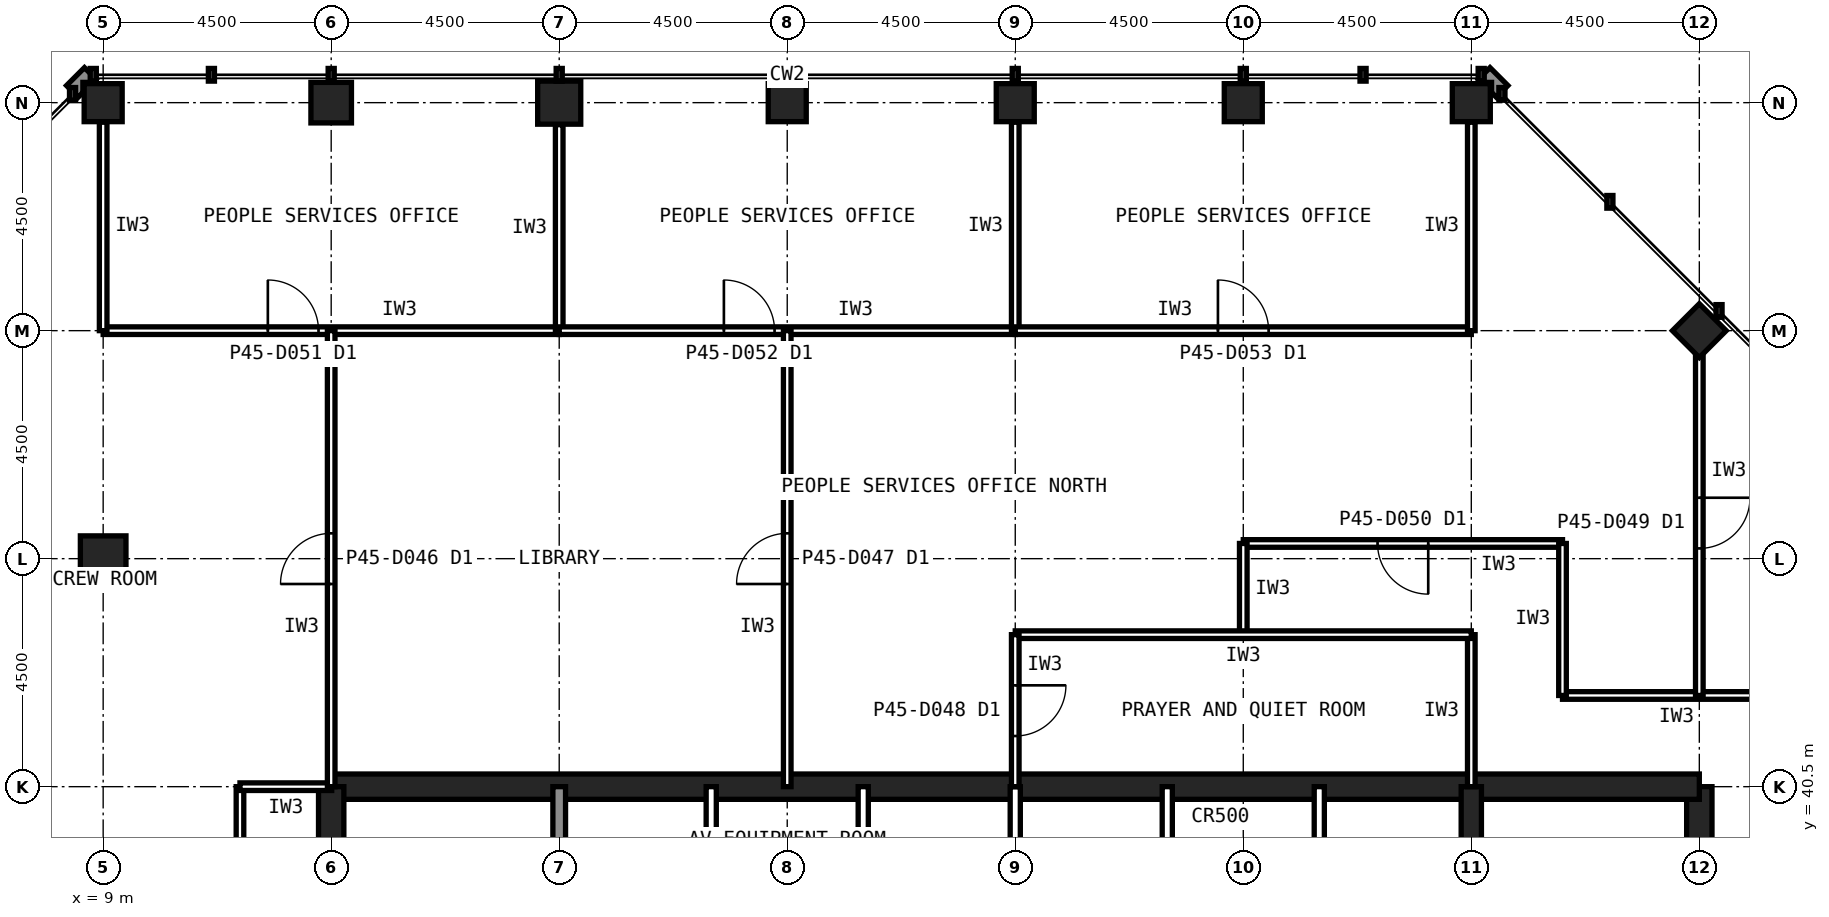
"""IFC4 building model, lengths in metres.
Left out: names, types, materials, properties, quantities, classifications, styles, units other than length and angle.
Written with IfcOpenShell. Run it as: python <this file> out.ifc"""

import sys

from ifc_helpers import new_model, si_unit, direction, frame, frame_2d, origin, origin_2d, place, context, subcontext, project, spatial, rectangle, hollow_rectangle, extrude, element, fill, save


model = new_model("IFC4")
c1 = context("Model", 3, precision=1e-05, world=origin(), true_north=direction((0.0, 1.0)))
c2 = subcontext(c1, "Body", "Model", "MODEL_VIEW")
j1 = project(units=[si_unit("LENGTHUNIT", "METRE"), si_unit("PLANEANGLEUNIT", "RADIAN")], contexts=[c1])
p1 = place(None, origin())
s1 = spatial("IfcSite", under=j1, at=p1, CompositionType="ELEMENT")
p2 = place(p1, origin())
s2 = spatial("IfcBuilding", under=s1, at=p2, CompositionType="ELEMENT")
p3 = place(p2, frame((0.0, 0.0, 191.6)))
s3 = spatial("IfcBuildingStorey", under=s2, at=p3, CompositionType="ELEMENT", Elevation=191.6)
for number, where, z_axis, x_axis in (
    (1, (36.0, 54.0, 0.0), (0.0, 0.0, 1.0), (1.0, 0.0, 0.0)),
    (2, (31.5, 54.0, 0.0), (0.0, 0.0, 1.0), (1.0, 0.0, 0.0)),
    (3, (27.0, 54.0, 0.0), (0.0, 0.0, 1.0), (1.0, 0.0, 0.0)),
    (4, (22.5, 54.0, 0.0), (0.0, 0.0, 1.0), (1.0, 0.0, 0.0)),
):
    element("IfcColumn", number, at=place(p3, frame(where, z_axis=z_axis, x_axis=x_axis)), inside=s3, PredefinedType="COLUMN", context=c2, shape_type="SweptSolid", body=[
        extrude(hollow_rectangle(XDim=0.75, YDim=0.75, WallThickness=0.04, at=origin_2d()), origin(), (0.0, 0.0, 1.0), 4.0),
    ])
p4 = place(p3, frame((18.0, 54.0, 0.0), z_axis=(0.0, 0.0, 1.0), x_axis=(1.0, 0.0, 0.0)))
e5 = element("IfcColumn", 5, at=p4, inside=s3, PredefinedType="COLUMN", context=c2, shape_type="SweptSolid", body=[
    extrude(hollow_rectangle(XDim=0.85, YDim=0.85, WallThickness=0.05, at=origin_2d()), origin(), (0.0, 0.0, 1.0), 4.0),
])
p5 = place(p3, frame((13.5, 54.0, 0.0), z_axis=(0.0, 0.0, 1.0), x_axis=(1.0, 0.0, 0.0)))
e6 = element("IfcColumn", 6, at=p5, inside=s3, PredefinedType="COLUMN", context=c2, shape_type="SweptSolid", body=[
    extrude(hollow_rectangle(XDim=0.8, YDim=0.8, WallThickness=0.045, at=origin_2d()), origin(), (0.0, 0.0, 1.0), 4.0),
])
for number, where, z_axis, x_axis in (
    (7, (9.0, 54.0, 0.0), (0.0, 0.0, 1.0), (1.0, 0.0, 0.0)),
    (8, (40.5, 49.5, 0.0), (0.0, 0.0, 1.0), (0.707, 0.707, 0.0)),
):
    element("IfcColumn", number, at=place(p3, frame(where, z_axis=z_axis, x_axis=x_axis)), inside=s3, PredefinedType="COLUMN", context=c2, shape_type="SweptSolid", body=[
        extrude(hollow_rectangle(XDim=0.75, YDim=0.75, WallThickness=0.04, at=origin_2d()), origin(), (0.0, 0.0, 1.0), 4.0),
    ])
p6 = place(p3, frame((9.0, 45.0, 0.0), z_axis=(0.0, 0.0, 1.0), x_axis=(1.0, 0.0, 0.0)))
e9 = element("IfcColumn", 9, at=p6, inside=s3, PredefinedType="COLUMN", context=c2, shape_type="SweptSolid", body=[
    extrude(hollow_rectangle(XDim=0.9, YDim=0.9, WallThickness=0.063, at=origin_2d()), origin(), (0.0, 0.0, 1.0), 4.0),
])
p7 = place(p3, frame((40.5, 13.5, 0.0), z_axis=(0.0, 0.0, 1.0), x_axis=(0.0, 1.0, 0.0)))
e10 = element("IfcWall", 10, at=p7, inside=s3, PredefinedType="SHEAR", context=c2, shape_type="SweptSolid", body=[
    extrude(rectangle(XDim=27.0, YDim=0.5, at=frame_2d((13.5, 0.0))), origin(), (0.0, 0.0, 1.0), 4.0),
])
p8 = place(p7, frame((5.85, 0.0, 0.0)))
e11 = element("IfcOpeningElement", 11, at=p8, cuts=e10, PredefinedType="OPENING", context=c2, shape_type="SweptSolid", body=[
    extrude(rectangle(XDim=1.8, YDim=2.1, at=frame_2d((0.9, 1.05))), frame((0.0, 0.26, 0.0), z_axis=(0.0, -1.0, 0.0), x_axis=(1.0, 0.0, 0.0)), (0.0, 0.0, 1.0), 0.52),
])
p9 = place(p7, frame((19.65, 0.0, 0.0)))
e12 = element("IfcOpeningElement", 12, at=p9, cuts=e10, PredefinedType="OPENING", context=c2, shape_type="SweptSolid", body=[
    extrude(rectangle(XDim=1.2, YDim=2.1, at=frame_2d((0.6, 1.05))), frame((0.0, 0.26, 0.0), z_axis=(0.0, -1.0, 0.0), x_axis=(1.0, 0.0, 0.0)), (0.0, 0.0, 1.0), 0.52),
])
p10 = place(p3, frame((40.5, 40.5, 0.0), z_axis=(0.0, 0.0, 1.0), x_axis=(-1.0, 0.0, 0.0)))
e13 = element("IfcWall", 13, at=p10, inside=s3, PredefinedType="SHEAR", context=c2, shape_type="SweptSolid", body=[
    extrude(rectangle(XDim=27.0, YDim=0.5, at=frame_2d((13.5, 0.0))), origin(), (0.0, 0.0, 1.0), 4.0),
])
p11 = place(p3, frame((13.5, 40.5, 0.0), z_axis=(0.0, 0.0, 1.0), x_axis=(0.0, -1.0, 0.0)))
e14 = element("IfcWall", 14, at=p11, inside=s3, PredefinedType="SHEAR", context=c2, shape_type="SweptSolid", body=[
    extrude(rectangle(XDim=27.0, YDim=0.5, at=frame_2d((13.5, 0.0))), origin(), (0.0, 0.0, 1.0), 4.0),
])
p12 = place(p11, frame((19.65, 0.0, 0.0)))
e15 = element("IfcOpeningElement", 15, at=p12, cuts=e14, PredefinedType="OPENING", context=c2, shape_type="SweptSolid", body=[
    extrude(rectangle(XDim=1.2, YDim=2.1, at=frame_2d((0.6, 1.05))), frame((0.0, 0.26, 0.0), z_axis=(0.0, -1.0, 0.0), x_axis=(1.0, 0.0, 0.0)), (0.0, 0.0, 1.0), 0.52),
])
p13 = place(p11, frame((5.85, 0.0, 0.0)))
e16 = element("IfcOpeningElement", 16, at=p13, cuts=e14, PredefinedType="OPENING", context=c2, shape_type="SweptSolid", body=[
    extrude(rectangle(XDim=1.8, YDim=2.1, at=frame_2d((0.9, 1.05))), frame((0.0, 0.26, 0.0), z_axis=(0.0, -1.0, 0.0), x_axis=(1.0, 0.0, 0.0)), (0.0, 0.0, 1.0), 0.52),
])
p14 = place(p3, frame((18.0, 36.0, 0.0), z_axis=(0.0, 0.0, 1.0), x_axis=(0.0, 1.0, 0.0)))
e17 = element("IfcWall", 17, at=p14, inside=s3, PredefinedType="SOLIDWALL", context=c2, shape_type="SweptSolid", body=[
    extrude(rectangle(XDim=4.5, YDim=0.25, at=frame_2d((2.25, 0.0))), origin(), (0.0, 0.0, 1.0), 3.84),
])
p15 = place(p3, frame((36.0, 22.5, 0.0), z_axis=(0.0, 0.0, 1.0), x_axis=(0.0, 1.0, 0.0)))
e18 = element("IfcWall", 18, at=p15, inside=s3, PredefinedType="SHEAR", context=c2, shape_type="SweptSolid", body=[
    extrude(rectangle(XDim=18.0, YDim=0.4, at=frame_2d((9.0, 0.0))), origin(), (0.0, 0.0, 1.0), 4.0),
])
for number, where, z_axis, x_axis in (
    (19, (21.0, 36.0, 0.0), (0.0, 0.0, 1.0), (0.0, 1.0, 0.0)),
    (20, (24.0, 36.0, 0.0), (0.0, 0.0, 1.0), (0.0, 1.0, 0.0)),
    (21, (27.0, 36.0, 0.0), (0.0, 0.0, 1.0), (0.0, 1.0, 0.0)),
    (22, (30.0, 36.0, 0.0), (0.0, 0.0, 1.0), (0.0, 1.0, 0.0)),
    (23, (33.0, 36.0, 0.0), (0.0, 0.0, 1.0), (0.0, 1.0, 0.0)),
):
    element("IfcWall", number, at=place(p3, frame(where, z_axis=z_axis, x_axis=x_axis)), inside=s3, PredefinedType="PARTITIONING", context=c2, shape_type="SweptSolid", body=[
        extrude(rectangle(XDim=4.5, YDim=0.2, at=frame_2d((2.25, 0.0))), origin(), (0.0, 0.0, 1.0), 3.84),
    ])
p16 = place(p3, frame((11.7, 40.5, 0.0), z_axis=(0.0, 0.0, 1.0), x_axis=(0.0, -1.0, 0.0)))
e24 = element("IfcWall", 24, at=p16, inside=s3, PredefinedType="PARTITIONING", context=c2, shape_type="SweptSolid", body=[
    extrude(rectangle(XDim=7.2, YDim=0.15, at=frame_2d((3.6, 0.0))), origin(), (0.0, 0.0, 1.0), 3.84),
])
p17 = place(p3, frame((37.8, 45.3, 0.0), z_axis=(0.0, 0.0, 1.0), x_axis=(-1.0, 0.0, 0.0)))
e25 = element("IfcWall", 25, at=p17, inside=s3, PredefinedType="PARTITIONING", context=c2, shape_type="SweptSolid", body=[
    extrude(rectangle(XDim=6.3, YDim=0.15, at=frame_2d((3.15, 0.0))), origin(), (0.0, 0.0, 1.0), 3.84),
])
p18 = place(p17, frame((2.65, 0.0, 0.0)))
e26 = element("IfcOpeningElement", 26, at=p18, cuts=e25, PredefinedType="OPENING", context=c2, shape_type="SweptSolid", body=[
    extrude(rectangle(XDim=1.0, YDim=2.1, at=frame_2d((0.5, 1.05))), frame((0.0, 0.085, 0.0), z_axis=(0.0, -1.0, 0.0), x_axis=(1.0, 0.0, 0.0)), (0.0, 0.0, 1.0), 0.17),
])
p19 = place(p3, frame((42.3, 42.3, 0.0), z_axis=(0.0, 0.0, 1.0), x_axis=(-1.0, 0.0, 0.0)))
e27 = element("IfcWall", 27, at=p19, inside=s3, PredefinedType="PARTITIONING", context=c2, shape_type="SweptSolid", body=[
    extrude(rectangle(XDim=4.5, YDim=0.15, at=frame_2d((2.25, 0.0))), origin(), (0.0, 0.0, 1.0), 3.84),
])
p20 = place(p3, frame((37.8, 42.3, 0.0), z_axis=(0.0, 0.0, 1.0), x_axis=(0.0, 1.0, 0.0)))
e28 = element("IfcWall", 28, at=p20, inside=s3, PredefinedType="PARTITIONING", context=c2, shape_type="SweptSolid", body=[
    extrude(rectangle(XDim=3.0, YDim=0.15, at=frame_2d((1.5, 0.0))), origin(), (0.0, 0.0, 1.0), 3.84),
])
p21 = place(p3, frame((13.51, 40.5, 0.0), z_axis=(0.0, 0.0, 1.0), x_axis=(-1.0, 0.0, 0.0)))
e29 = element("IfcWall", 29, at=p21, inside=s3, PredefinedType="PARTITIONING", context=c2, shape_type="SweptSolid", body=[
    extrude(rectangle(XDim=1.81, YDim=0.15, at=frame_2d((0.905, 0.0))), origin(), (0.0, 0.0, 1.0), 2.989),
])
p22 = place(p3, frame((31.5, 45.3, 0.0), z_axis=(0.0, 0.0, 1.0), x_axis=(0.0, -1.0, 0.0)))
e30 = element("IfcWall", 30, at=p22, inside=s3, PredefinedType="PARTITIONING", context=c2, shape_type="SweptSolid", body=[
    extrude(rectangle(XDim=1.8, YDim=0.15, at=frame_2d((0.9, 0.0))), origin(), (0.0, 0.0, 1.0), 2.989),
])
p23 = place(p3, frame((36.0, 40.5, 0.0), z_axis=(0.0, 0.0, 1.0), x_axis=(0.0, 1.0, 0.0)))
e31 = element("IfcWall", 31, at=p23, inside=s3, PredefinedType="PARTITIONING", context=c2, shape_type="SweptSolid", body=[
    extrude(rectangle(XDim=3.0, YDim=0.15, at=frame_2d((1.5, 0.0))), origin(), (0.0, 0.0, 1.0), 2.989),
])
p24 = place(p3, frame((36.0, 43.5, 0.0), z_axis=(0.0, 0.0, 1.0), x_axis=(-1.0, 0.0, 0.0)))
e32 = element("IfcWall", 32, at=p24, inside=s3, PredefinedType="PARTITIONING", context=c2, shape_type="SweptSolid", body=[
    extrude(rectangle(XDim=9.0, YDim=0.15, at=frame_2d((4.5, 0.0))), origin(), (0.0, 0.0, 1.0), 3.84),
])
p25 = place(p3, frame((27.0, 43.5, 0.0), z_axis=(0.0, 0.0, 1.0), x_axis=(0.0, -1.0, 0.0)))
e33 = element("IfcWall", 33, at=p25, inside=s3, PredefinedType="PARTITIONING", context=c2, shape_type="SweptSolid", body=[
    extrude(rectangle(XDim=3.0, YDim=0.15, at=frame_2d((1.5, 0.0))), origin(), (0.0, 0.0, 1.0), 2.989),
])
p26 = place(p25, frame((1.0, 0.0, 0.0)))
e34 = element("IfcOpeningElement", 34, at=p26, cuts=e33, PredefinedType="OPENING", context=c2, shape_type="SweptSolid", body=[
    extrude(rectangle(XDim=1.0, YDim=2.1, at=frame_2d((0.5, 1.05))), frame((0.0, 0.085, 0.0), z_axis=(0.0, -1.0, 0.0), x_axis=(1.0, 0.0, 0.0)), (0.0, 0.0, 1.0), 0.17),
])
p27 = place(p3, frame((9.0, 49.5, 0.0), z_axis=(0.0, 0.0, 1.0), x_axis=(1.0, 0.0, 0.0)))
e35 = element("IfcWall", 35, at=p27, inside=s3, PredefinedType="PARTITIONING", context=c2, shape_type="SweptSolid", body=[
    extrude(rectangle(XDim=9.0, YDim=0.15, at=frame_2d((4.5, 0.0))), origin(), (0.0, 0.0, 1.0), 3.84),
])
p28 = place(p27, frame((3.25, 0.0, 0.0)))
e36 = element("IfcOpeningElement", 36, at=p28, cuts=e35, PredefinedType="OPENING", context=c2, shape_type="SweptSolid", body=[
    extrude(rectangle(XDim=1.0, YDim=2.1, at=frame_2d((0.5, 1.05))), frame((0.0, 0.085, 0.0), z_axis=(0.0, -1.0, 0.0), x_axis=(1.0, 0.0, 0.0)), (0.0, 0.0, 1.0), 0.17),
])
p29 = place(p3, frame((18.0, 49.5, 0.0), z_axis=(0.0, 0.0, 1.0), x_axis=(0.0, 1.0, 0.0)))
e37 = element("IfcWall", 37, at=p29, inside=s3, PredefinedType="PARTITIONING", context=c2, shape_type="SweptSolid", body=[
    extrude(rectangle(XDim=4.065, YDim=0.15, at=frame_2d((2.032, 0.0))), origin(), (0.0, 0.0, 1.0), 2.989),
])
p30 = place(p3, frame((9.0, 53.615, 0.0), z_axis=(0.0, 0.0, 1.0), x_axis=(0.0, -1.0, 0.0)))
e38 = element("IfcWall", 38, at=p30, inside=s3, PredefinedType="PARTITIONING", context=c2, shape_type="SweptSolid", body=[
    extrude(rectangle(XDim=4.115, YDim=0.15, at=frame_2d((2.058, 0.0))), origin(), (0.0, 0.0, 1.0), 3.229),
])
p31 = place(p3, frame((18.0, 49.5, 0.0), z_axis=(0.0, 0.0, 1.0), x_axis=(1.0, 0.0, 0.0)))
e39 = element("IfcWall", 39, at=p31, inside=s3, PredefinedType="PARTITIONING", context=c2, shape_type="SweptSolid", body=[
    extrude(rectangle(XDim=9.0, YDim=0.15, at=frame_2d((4.5, 0.0))), origin(), (0.0, 0.0, 1.0), 3.84),
])
p32 = place(p31, frame((3.25, 0.0, 0.0)))
e40 = element("IfcOpeningElement", 40, at=p32, cuts=e39, PredefinedType="OPENING", context=c2, shape_type="SweptSolid", body=[
    extrude(rectangle(XDim=1.0, YDim=2.1, at=frame_2d((0.5, 1.05))), frame((0.0, 0.085, 0.0), z_axis=(0.0, -1.0, 0.0), x_axis=(1.0, 0.0, 0.0)), (0.0, 0.0, 1.0), 0.17),
])
p33 = place(p3, frame((27.0, 49.5, 0.0), z_axis=(0.0, 0.0, 1.0), x_axis=(0.0, 1.0, 0.0)))
e41 = element("IfcWall", 41, at=p33, inside=s3, PredefinedType="PARTITIONING", context=c2, shape_type="SweptSolid", body=[
    extrude(rectangle(XDim=4.115, YDim=0.15, at=frame_2d((2.058, 0.0))), origin(), (0.0, 0.0, 1.0), 2.989),
])
p34 = place(p3, frame((27.0, 49.5, 0.0), z_axis=(0.0, 0.0, 1.0), x_axis=(1.0, 0.0, 0.0)))
e42 = element("IfcWall", 42, at=p34, inside=s3, PredefinedType="PARTITIONING", context=c2, shape_type="SweptSolid", body=[
    extrude(rectangle(XDim=9.0, YDim=0.15, at=frame_2d((4.5, 0.0))), origin(), (0.0, 0.0, 1.0), 3.84),
])
p35 = place(p34, frame((4.0, 0.0, 0.0)))
e43 = element("IfcOpeningElement", 43, at=p35, cuts=e42, PredefinedType="OPENING", context=c2, shape_type="SweptSolid", body=[
    extrude(rectangle(XDim=1.0, YDim=2.1, at=frame_2d((0.5, 1.05))), frame((0.0, 0.085, 0.0), z_axis=(0.0, -1.0, 0.0), x_axis=(1.0, 0.0, 0.0)), (0.0, 0.0, 1.0), 0.17),
])
p36 = place(p3, frame((36.0, 49.5, 0.0), z_axis=(0.0, 0.0, 1.0), x_axis=(0.0, 1.0, 0.0)))
e44 = element("IfcWall", 44, at=p36, inside=s3, PredefinedType="PARTITIONING", context=c2, shape_type="SweptSolid", body=[
    extrude(rectangle(XDim=4.115, YDim=0.15, at=frame_2d((2.058, 0.0))), origin(), (0.0, 0.0, 1.0), 2.989),
])
p37 = place(p3, frame((22.5, 40.5, 0.0), z_axis=(0.0, 0.0, 1.0), x_axis=(0.0, 1.0, 0.0)))
e45 = element("IfcWall", 45, at=p37, inside=s3, PredefinedType="PARTITIONING", context=c2, shape_type="SweptSolid", body=[
    extrude(rectangle(XDim=9.0, YDim=0.15, at=frame_2d((4.5, 0.0))), origin(), (0.0, 0.0, 1.0), 2.989),
])
p38 = place(p37, frame((4.0, 0.0, 0.0)))
e46 = element("IfcOpeningElement", 46, at=p38, cuts=e45, PredefinedType="OPENING", context=c2, shape_type="SweptSolid", body=[
    extrude(rectangle(XDim=1.0, YDim=2.1, at=frame_2d((0.5, 1.05))), frame((0.0, 0.085, 0.0), z_axis=(0.0, -1.0, 0.0), x_axis=(1.0, 0.0, 0.0)), (0.0, 0.0, 1.0), 0.17),
])
p39 = place(p3, frame((40.5, 49.105, 0.0), z_axis=(0.0, 0.0, 1.0), x_axis=(0.0, -1.0, 0.0)))
e47 = element("IfcWall", 47, at=p39, inside=s3, PredefinedType="PARTITIONING", context=c2, shape_type="SweptSolid", body=[
    extrude(rectangle(XDim=6.805, YDim=0.15, at=frame_2d((3.402, 0.0))), origin(), (0.0, 0.0, 1.0), 2.989),
])
p40 = place(p39, frame((2.903, 0.0, 0.0)))
e48 = element("IfcOpeningElement", 48, at=p40, cuts=e47, PredefinedType="OPENING", context=c2, shape_type="SweptSolid", body=[
    extrude(rectangle(XDim=1.0, YDim=2.1, at=frame_2d((0.5, 1.05))), frame((0.0, 0.085, 0.0), z_axis=(0.0, -1.0, 0.0), x_axis=(1.0, 0.0, 0.0)), (0.0, 0.0, 1.0), 0.17),
])
p41 = place(p3, frame((13.5, 40.5, 0.0), z_axis=(0.0, 0.0, 1.0), x_axis=(0.0, 1.0, 0.0)))
e49 = element("IfcWall", 49, at=p41, inside=s3, PredefinedType="PARTITIONING", context=c2, shape_type="SweptSolid", body=[
    extrude(rectangle(XDim=9.0, YDim=0.15, at=frame_2d((4.5, 0.0))), origin(), (0.0, 0.0, 1.0), 2.989),
])
p42 = place(p41, frame((4.0, 0.0, 0.0)))
e50 = element("IfcOpeningElement", 50, at=p42, cuts=e49, PredefinedType="OPENING", context=c2, shape_type="SweptSolid", body=[
    extrude(rectangle(XDim=1.0, YDim=2.1, at=frame_2d((0.5, 1.05))), frame((0.0, 0.085, 0.0), z_axis=(0.0, -1.0, 0.0), x_axis=(1.0, 0.0, 0.0)), (0.0, 0.0, 1.0), 0.17),
])
p43 = place(p18, origin())
e51 = element("IfcDoor", 51, at=p43, inside=s3, OperationType="SINGLE_SWING_LEFT", PredefinedType="DOOR", context=c2, shape_type="SweptSolid", body=[
    extrude(rectangle(XDim=1.0, YDim=2.1, at=frame_2d((0.5, 1.05))), frame((0.0, 0.025, 0.0), z_axis=(0.0, -1.0, 0.0), x_axis=(1.0, 0.0, 0.0)), (0.0, 0.0, 1.0), 0.05),
])
fill(e26, e51)
p44 = place(p26, origin())
e52 = element("IfcDoor", 52, at=p44, inside=s3, OperationType="SINGLE_SWING_LEFT", PredefinedType="DOOR", context=c2, shape_type="SweptSolid", body=[
    extrude(rectangle(XDim=1.0, YDim=2.1, at=frame_2d((0.5, 1.05))), frame((0.0, 0.025, 0.0), z_axis=(0.0, -1.0, 0.0), x_axis=(1.0, 0.0, 0.0)), (0.0, 0.0, 1.0), 0.05),
])
fill(e34, e52)
p45 = place(p28, origin())
e53 = element("IfcDoor", 53, at=p45, inside=s3, OperationType="SINGLE_SWING_LEFT", PredefinedType="DOOR", context=c2, shape_type="SweptSolid", body=[
    extrude(rectangle(XDim=1.0, YDim=2.1, at=frame_2d((0.5, 1.05))), frame((0.0, 0.025, 0.0), z_axis=(0.0, -1.0, 0.0), x_axis=(1.0, 0.0, 0.0)), (0.0, 0.0, 1.0), 0.05),
])
fill(e36, e53)
p46 = place(p32, origin())
e54 = element("IfcDoor", 54, at=p46, inside=s3, OperationType="SINGLE_SWING_LEFT", PredefinedType="DOOR", context=c2, shape_type="SweptSolid", body=[
    extrude(rectangle(XDim=1.0, YDim=2.1, at=frame_2d((0.5, 1.05))), frame((0.0, 0.025, 0.0), z_axis=(0.0, -1.0, 0.0), x_axis=(1.0, 0.0, 0.0)), (0.0, 0.0, 1.0), 0.05),
])
fill(e40, e54)
p47 = place(p35, origin())
e55 = element("IfcDoor", 55, at=p47, inside=s3, OperationType="SINGLE_SWING_LEFT", PredefinedType="DOOR", context=c2, shape_type="SweptSolid", body=[
    extrude(rectangle(XDim=1.0, YDim=2.1, at=frame_2d((0.5, 1.05))), frame((0.0, 0.025, 0.0), z_axis=(0.0, -1.0, 0.0), x_axis=(1.0, 0.0, 0.0)), (0.0, 0.0, 1.0), 0.05),
])
fill(e43, e55)
p48 = place(p38, origin())
e56 = element("IfcDoor", 56, at=p48, inside=s3, OperationType="SINGLE_SWING_LEFT", PredefinedType="DOOR", context=c2, shape_type="SweptSolid", body=[
    extrude(rectangle(XDim=1.0, YDim=2.1, at=frame_2d((0.5, 1.05))), frame((0.0, 0.025, 0.0), z_axis=(0.0, -1.0, 0.0), x_axis=(1.0, 0.0, 0.0)), (0.0, 0.0, 1.0), 0.05),
])
fill(e46, e56)
p49 = place(p40, origin())
e57 = element("IfcDoor", 57, at=p49, inside=s3, OperationType="SINGLE_SWING_LEFT", PredefinedType="DOOR", context=c2, shape_type="SweptSolid", body=[
    extrude(rectangle(XDim=1.0, YDim=2.1, at=frame_2d((0.5, 1.05))), frame((0.0, 0.025, 0.0), z_axis=(0.0, -1.0, 0.0), x_axis=(1.0, 0.0, 0.0)), (0.0, 0.0, 1.0), 0.05),
])
fill(e48, e57)
p50 = place(p42, origin())
e58 = element("IfcDoor", 58, at=p50, inside=s3, OperationType="SINGLE_SWING_LEFT", PredefinedType="DOOR", context=c2, shape_type="SweptSolid", body=[
    extrude(rectangle(XDim=1.0, YDim=2.1, at=frame_2d((0.5, 1.05))), frame((0.0, 0.025, 0.0), z_axis=(0.0, -1.0, 0.0), x_axis=(1.0, 0.0, 0.0)), (0.0, 0.0, 1.0), 0.05),
])
fill(e50, e58)
save(model, sys.argv[1])
